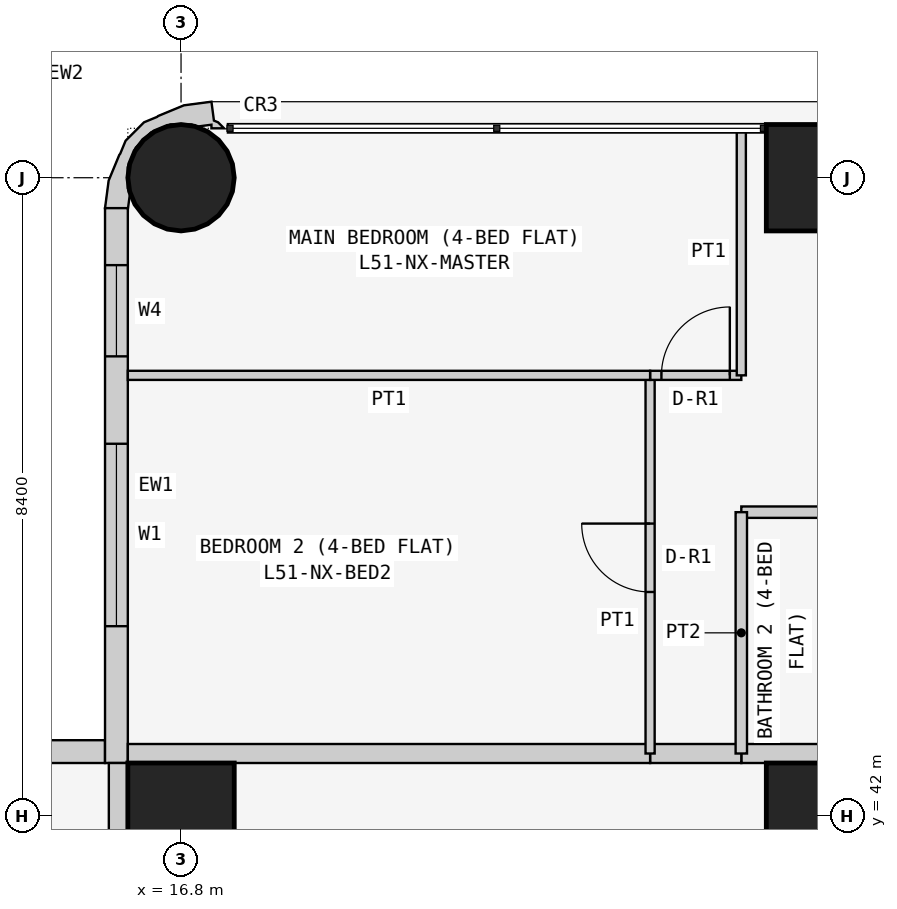
"""IFC4 building model, lengths in metres.
Left out: names, types, materials, properties, quantities, classifications, styles, units other than length and angle.
Written with IfcOpenShell. Run it as: python <this file> out.ifc"""

import sys

from ifc_helpers import new_model, si_unit, direction, frame, frame_2d, origin, origin_2d, place, context, subcontext, project, spatial, polyline, rectangle, circle, outline, extrude, element, fill, save


model = new_model("IFC4")
c1 = context("Model", 3, precision=1e-05, world=origin(), true_north=direction((0.0, 1.0)))
c2 = subcontext(c1, "Body", "Model", "MODEL_VIEW")
j1 = project(units=[si_unit("LENGTHUNIT", "METRE"), si_unit("PLANEANGLEUNIT", "RADIAN")], contexts=[c1])
p1 = place(None, origin())
s1 = spatial("IfcSite", under=j1, at=p1, CompositionType="ELEMENT")
p2 = place(p1, origin())
s2 = spatial("IfcBuilding", under=s1, at=p2, CompositionType="ELEMENT")
p3 = place(p2, frame((0.0, 0.0, 197.7)))
s3 = spatial("IfcBuildingStorey", under=s2, at=p3, CompositionType="ELEMENT", Elevation=197.7)
p4 = place(p3, frame((16.8, 42.0, 0.0), z_axis=(0.0, 0.0, 1.0), x_axis=(1.0, 0.0, 0.0)))
e1 = element("IfcColumn", 1, at=p4, inside=s3, PredefinedType="COLUMN", context=c2, shape_type="SweptSolid", body=[
    extrude(rectangle(XDim=1.4, YDim=1.4, at=origin_2d()), origin(), (0.0, 0.0, 1.0), 3.6),
])
p5 = place(p3, frame((16.8, 50.4, 0.0), z_axis=(0.0, 0.0, 1.0), x_axis=(1.0, 0.0, 0.0)))
e2 = element("IfcColumn", 2, at=p5, inside=s3, PredefinedType="COLUMN", context=c2, shape_type="SweptSolid", body=[
    extrude(circle(Radius=0.7, at=origin_2d()), origin(), (0.0, 0.0, 1.0), 3.6),
])
for number, where, z_axis, x_axis in (
    (3, (25.2, 42.0, 0.0), (0.0, 0.0, 1.0), (1.0, 0.0, 0.0)),
    (4, (25.2, 50.4, 0.0), (0.0, 0.0, 1.0), (1.0, 0.0, 0.0)),
):
    element("IfcColumn", number, at=place(p3, frame(where, z_axis=z_axis, x_axis=x_axis)), inside=s3, PredefinedType="COLUMN", context=c2, shape_type="SweptSolid", body=[
        extrude(rectangle(XDim=1.4, YDim=1.4, at=origin_2d()), origin(), (0.0, 0.0, 1.0), 3.6),
    ])
p6 = place(p3, frame((15.8, 42.85, 0.0), z_axis=(0.0, 0.0, 1.0), x_axis=(-1.0, 0.0, 0.0)))
e5 = element("IfcWall", 5, at=p6, inside=s3, PredefinedType="SOLIDWALL", context=c2, shape_type="SweptSolid", body=[
    extrude(rectangle(XDim=15.4, YDim=0.3, at=frame_2d((7.7, 0.0))), origin(), (0.0, 0.0, 1.0), 3.45),
])
p7 = place(p6, frame((1.2, 0.0, 0.9)))
e6 = element("IfcOpeningElement", 6, at=p7, cuts=e5, PredefinedType="OPENING", context=c2, shape_type="SweptSolid", body=[
    extrude(rectangle(XDim=1.8, YDim=1.5, at=frame_2d((0.9, 0.75))), frame((0.0, 0.16, 0.0), z_axis=(0.0, -1.0, 0.0), x_axis=(1.0, 0.0, 0.0)), (0.0, 0.0, 1.0), 0.32),
])
p8 = place(p6, frame((4.95, 0.0, 1.5)))
e7 = element("IfcOpeningElement", 7, at=p8, cuts=e5, PredefinedType="OPENING", context=c2, shape_type="SweptSolid", body=[
    extrude(rectangle(XDim=0.9, YDim=0.7, at=frame_2d((0.45, 0.35))), frame((0.0, 0.16, 0.0), z_axis=(0.0, -1.0, 0.0), x_axis=(1.0, 0.0, 0.0)), (0.0, 0.0, 1.0), 0.32),
])
p9 = place(p6, frame((8.5, 0.0, 0.9)))
e8 = element("IfcOpeningElement", 8, at=p9, cuts=e5, PredefinedType="OPENING", context=c2, shape_type="SweptSolid", body=[
    extrude(rectangle(XDim=1.8, YDim=1.5, at=frame_2d((0.9, 0.75))), frame((0.0, 0.16, 0.0), z_axis=(0.0, -1.0, 0.0), x_axis=(1.0, 0.0, 0.0)), (0.0, 0.0, 1.0), 0.32),
])
p10 = place(p6, frame((12.5, 0.0, 0.0)))
e9 = element("IfcOpeningElement", 9, at=p10, cuts=e5, PredefinedType="OPENING", context=c2, shape_type="SweptSolid", body=[
    extrude(rectangle(XDim=0.9, YDim=2.4, at=frame_2d((0.45, 1.2))), frame((0.0, 0.16, 0.0), z_axis=(0.0, -1.0, 0.0), x_axis=(1.0, 0.0, 0.0)), (0.0, 0.0, 1.0), 0.32),
])
p11 = place(p6, frame((13.5, 0.0, 0.9)))
e10 = element("IfcOpeningElement", 10, at=p11, cuts=e5, PredefinedType="OPENING", context=c2, shape_type="SweptSolid", body=[
    extrude(rectangle(XDim=1.2, YDim=1.5, at=frame_2d((0.6, 0.75))), frame((0.0, 0.16, 0.0), z_axis=(0.0, -1.0, 0.0), x_axis=(1.0, 0.0, 0.0)), (0.0, 0.0, 1.0), 0.32),
])
p12 = place(p3, frame((15.95, 50.0, 0.0), z_axis=(0.0, 0.0, 1.0), x_axis=(0.0, -1.0, 0.0)))
e11 = element("IfcWall", 11, at=p12, inside=s3, PredefinedType="SOLIDWALL", context=c2, shape_type="SweptSolid", body=[
    extrude(rectangle(XDim=7.3, YDim=0.3, at=frame_2d((3.65, 0.0))), origin(), (0.0, 0.0, 1.0), 3.45),
])
p13 = place(p12, frame((3.1, 0.0, 0.9)))
e12 = element("IfcOpeningElement", 12, at=p13, cuts=e11, PredefinedType="OPENING", context=c2, shape_type="SweptSolid", body=[
    extrude(rectangle(XDim=2.4, YDim=1.5, at=frame_2d((1.2, 0.75))), frame((0.0, 0.16, 0.0), z_axis=(0.0, -1.0, 0.0), x_axis=(1.0, 0.0, 0.0)), (0.0, 0.0, 1.0), 0.32),
])
p14 = place(p12, frame((0.75, 0.0, 0.9)))
e13 = element("IfcOpeningElement", 13, at=p14, cuts=e11, PredefinedType="OPENING", context=c2, shape_type="SweptSolid", body=[
    extrude(rectangle(XDim=1.2, YDim=1.5, at=frame_2d((0.6, 0.75))), frame((0.0, 0.16, 0.0), z_axis=(0.0, -1.0, 0.0), x_axis=(1.0, 0.0, 0.0)), (0.0, 0.0, 1.0), 0.32),
])
p15 = place(p3, frame((17.312, 50.988, 0.0), z_axis=(0.0, 0.0, 1.0), x_axis=(-0.439933741929, 0.898030234854, 0.0)))
e14 = element("IfcWall", 14, at=p15, inside=s3, PredefinedType="SOLIDWALL", context=c2, shape_type="SweptSolid", body=[
    extrude(outline(polyline([(0.138, -0.039), (0.182, -0.0), (0.419, -0.08), (0.536, 0.266), (0.559, 0.631), (0.555, 0.651), (0.566, 0.836), (0.456, 1.159), (0.333, 1.298), (0.324, 1.316), (0.082, 1.591), (-0.222, 1.793), (-0.39, 1.541), (-0.372, 1.532), (-0.195, 1.414), (-0.12, 1.41), (0.131, 1.287), (0.315, 1.078), (0.406, 0.814), (0.388, 0.536), (0.265, 0.285), (0.209, 0.236), (0.148, 0.053), (0.105, 0.074), (0.032, -0.076), (0.138, -0.039)])), origin(), (0.0, 0.0, 1.0), 3.45),
])
p16 = place(p3, frame((24.171, 42.825, 0.0), z_axis=(0.0, 0.0, 1.0), x_axis=(1.0, 0.0, 0.0)))
e15 = element("IfcWall", 15, at=p16, inside=s3, PredefinedType="PARTITIONING", context=c2, shape_type="SweptSolid", body=[
    extrude(rectangle(XDim=2.629, YDim=0.25, at=frame_2d((1.314, 0.0))), origin(), (0.0, 0.0, 1.0), 3.45),
])
p17 = place(p3, frame((22.971, 42.825, 0.0), z_axis=(0.0, 0.0, 1.0), x_axis=(1.0, 0.0, 0.0)))
e16 = element("IfcWall", 16, at=p17, inside=s3, PredefinedType="PARTITIONING", context=c2, shape_type="SweptSolid", body=[
    extrude(rectangle(XDim=1.2, YDim=0.25, at=frame_2d((0.6, 0.0))), origin(), (0.0, 0.0, 1.0), 3.45),
])
for number, where, z_axis, x_axis in (
    (17, (16.1, 42.825, 0.0), (0.0, 0.0, 1.0), (1.0, 0.0, 0.0)),
    (18, (15.975, 35.829, 0.0), (0.0, 0.0, 1.0), (0.0, 1.0, 0.0)),
):
    element("IfcWall", number, at=place(p3, frame(where, z_axis=z_axis, x_axis=x_axis)), inside=s3, PredefinedType="PARTITIONING", context=c2, shape_type="SweptSolid", body=[
        extrude(rectangle(XDim=6.871, YDim=0.25, at=frame_2d((3.436, 0.0))), origin(), (0.0, 0.0, 1.0), 3.45),
    ])
p18 = place(p3, frame((26.8, 46.0, 0.0), z_axis=(0.0, 0.0, 1.0), x_axis=(-1.0, 0.0, 0.0)))
e19 = element("IfcWall", 19, at=p18, inside=s3, PredefinedType="PARTITIONING", context=c2, shape_type="SweptSolid", body=[
    extrude(rectangle(XDim=2.629, YDim=0.15, at=frame_2d((1.314, 0.0))), origin(), (0.0, 0.0, 1.0), 3.45),
])
p19 = place(p3, frame((24.171, 46.0, 0.0), z_axis=(0.0, 0.0, 1.0), x_axis=(0.0, -1.0, 0.0)))
e20 = element("IfcWall", 20, at=p19, inside=s3, PredefinedType="PARTITIONING", context=c2, shape_type="SweptSolid", body=[
    extrude(rectangle(XDim=3.175, YDim=0.15, at=frame_2d((1.587, 0.0))), origin(), (0.0, 0.0, 1.0), 3.45),
])
p20 = place(p3, frame((22.971, 42.825, 0.0), z_axis=(0.0, 0.0, 1.0), x_axis=(0.0, 1.0, 0.0)))
e21 = element("IfcWall", 21, at=p20, inside=s3, PredefinedType="PARTITIONING", context=c2, shape_type="SweptSolid", body=[
    extrude(rectangle(XDim=4.975, YDim=0.12, at=frame_2d((2.488, 0.0))), origin(), (0.0, 0.0, 1.0), 3.45),
])
p21 = place(p20, frame((2.125, 0.0, 0.0)))
e22 = element("IfcOpeningElement", 22, at=p21, cuts=e21, PredefinedType="OPENING", context=c2, shape_type="SweptSolid", body=[
    extrude(rectangle(XDim=0.9, YDim=2.1, at=frame_2d((0.45, 1.05))), frame((0.0, 0.07, 0.0), z_axis=(0.0, -1.0, 0.0), x_axis=(1.0, 0.0, 0.0)), (0.0, 0.0, 1.0), 0.14),
])
p22 = place(p3, frame((22.971, 47.8, 0.0), z_axis=(0.0, 0.0, 1.0), x_axis=(1.0, 0.0, 0.0)))
e23 = element("IfcWall", 23, at=p22, inside=s3, PredefinedType="PARTITIONING", context=c2, shape_type="SweptSolid", body=[
    extrude(rectangle(XDim=1.2, YDim=0.12, at=frame_2d((0.6, 0.0))), origin(), (0.0, 0.0, 1.0), 3.45),
])
p23 = place(p22, frame((0.149, 0.0, 0.0)))
e24 = element("IfcOpeningElement", 24, at=p23, cuts=e23, PredefinedType="OPENING", context=c2, shape_type="SweptSolid", body=[
    extrude(rectangle(XDim=0.9, YDim=2.1, at=frame_2d((0.45, 1.05))), frame((0.0, 0.07, 0.0), z_axis=(0.0, -1.0, 0.0), x_axis=(1.0, 0.0, 0.0)), (0.0, 0.0, 1.0), 0.14),
])
p24 = place(p3, frame((24.171, 47.8, 0.0), z_axis=(0.0, 0.0, 1.0), x_axis=(0.0, 1.0, 0.0)))
e25 = element("IfcWall", 25, at=p24, inside=s3, PredefinedType="PARTITIONING", context=c2, shape_type="SweptSolid", body=[
    extrude(rectangle(XDim=3.25, YDim=0.12, at=frame_2d((1.625, 0.0))), origin(), (0.0, 0.0, 1.0), 3.45),
])
p25 = place(p3, frame((22.971, 47.8, 0.0), z_axis=(0.0, 0.0, 1.0), x_axis=(-1.0, 0.0, 0.0)))
e26 = element("IfcWall", 26, at=p25, inside=s3, PredefinedType="PARTITIONING", context=c2, shape_type="SweptSolid", body=[
    extrude(rectangle(XDim=6.871, YDim=0.12, at=frame_2d((3.436, 0.0))), origin(), (0.0, 0.0, 1.0), 3.45),
])
p26 = place(p13, origin())
e27 = element("IfcWindow", 27, at=p26, inside=s3, PartitioningType="SINGLE_PANEL", PredefinedType="WINDOW", context=c2, shape_type="SweptSolid", body=[
    extrude(rectangle(XDim=2.4, YDim=1.5, at=frame_2d((1.2, 0.75))), frame((0.0, 0.03, 0.0), z_axis=(0.0, -1.0, 0.0), x_axis=(1.0, 0.0, 0.0)), (0.0, 0.0, 1.0), 0.06),
])
fill(e12, e27)
p27 = place(p14, origin())
e28 = element("IfcWindow", 28, at=p27, inside=s3, PartitioningType="SINGLE_PANEL", PredefinedType="WINDOW", context=c2, shape_type="SweptSolid", body=[
    extrude(rectangle(XDim=1.2, YDim=1.5, at=frame_2d((0.6, 0.75))), frame((0.0, 0.03, 0.0), z_axis=(0.0, -1.0, 0.0), x_axis=(1.0, 0.0, 0.0)), (0.0, 0.0, 1.0), 0.06),
])
fill(e13, e28)
p28 = place(p21, origin())
e29 = element("IfcDoor", 29, at=p28, inside=s3, OperationType="SINGLE_SWING_RIGHT", PredefinedType="DOOR", context=c2, shape_type="SweptSolid", body=[
    extrude(rectangle(XDim=0.9, YDim=2.1, at=frame_2d((0.45, 1.05))), frame((0.0, 0.025, 0.0), z_axis=(0.0, -1.0, 0.0), x_axis=(1.0, 0.0, 0.0)), (0.0, 0.0, 1.0), 0.05),
])
fill(e22, e29)
p29 = place(p23, origin())
e30 = element("IfcDoor", 30, at=p29, inside=s3, OperationType="SINGLE_SWING_RIGHT", PredefinedType="DOOR", context=c2, shape_type="SweptSolid", body=[
    extrude(rectangle(XDim=0.9, YDim=2.1, at=frame_2d((0.45, 1.05))), frame((0.0, 0.025, 0.0), z_axis=(0.0, -1.0, 0.0), x_axis=(1.0, 0.0, 0.0)), (0.0, 0.0, 1.0), 0.05),
])
fill(e24, e30)
save(model, sys.argv[1])
